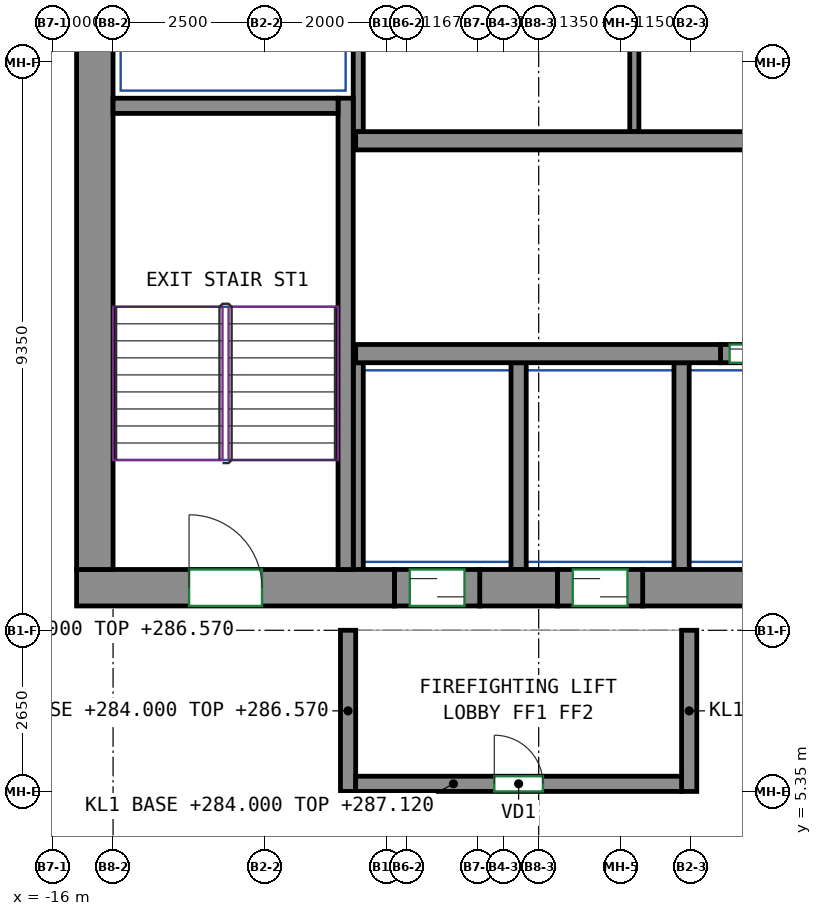
"""IFC4 building model, lengths in metres.
Left out: names, types, materials, properties, quantities, classifications, styles, units other than length and angle.
Written with IfcOpenShell. Run it as: python <this file> out.ifc"""

import sys

from ifc_helpers import new_model, si_unit, direction, frame, frame_2d, origin, place, context, subcontext, project, spatial, rectangle, extrude, source, transform, mapped, element, fill, save


model = new_model("IFC4")
c1 = context("Model", 3, precision=1e-05, world=origin(), true_north=direction((0.0, 1.0)))
c2 = subcontext(c1, "Body", "Model", "MODEL_VIEW")
j1 = project(units=[si_unit("LENGTHUNIT", "METRE"), si_unit("PLANEANGLEUNIT", "RADIAN")], contexts=[c1])
p1 = place(None, origin())
s1 = spatial("IfcSite", under=j1, at=p1, CompositionType="ELEMENT")
p2 = place(p1, origin())
s2 = spatial("IfcBuilding", under=s1, at=p2, CompositionType="ELEMENT")
p3 = place(p2, frame((0.0, 0.0, 284.0)))
s3 = spatial("IfcBuildingStorey", under=s2, at=p3, CompositionType="ELEMENT", Elevation=284.0)
m1 = source(origin(), c2, "Body", "SweptSolid", [
    extrude(rectangle(XDim=5.23, YDim=0.6, at=frame_2d((2.615, 0.0))), origin(), (0.0, 0.0, 1.0), 3.12),
])
p4 = place(p3, frame((-15.6, 8.7, 0.0), z_axis=(0.0, 0.0, 1.0), x_axis=(1.0, 0.0, 0.0)))
e1 = element("IfcWall", 1, at=p4, inside=s3, PredefinedType="SHEAR", context=c2, shape_type="MappedRepresentation", body=[
    mapped(m1, transform((0.0, 0.0, 0.0))),
])
p5 = place(p4, frame((1.85, 0.0, 0.0)))
e2 = element("IfcOpeningElement", 2, at=p5, cuts=e1, PredefinedType="OPENING", context=c2, shape_type="SweptSolid", body=[
    extrude(rectangle(XDim=1.2, YDim=2.1, at=frame_2d((0.6, 1.05))), frame((0.0, 0.31, 0.0), z_axis=(0.0, -1.0, 0.0), x_axis=(1.0, 0.0, 0.0)), (0.0, 0.0, 1.0), 0.62),
])
m2 = source(origin(), c2, "Body", "SweptSolid", [
    extrude(rectangle(XDim=1.28, YDim=0.6, at=frame_2d((0.64, 0.0))), origin(), (0.0, 0.0, 1.0), 3.12),
])
p6 = place(p3, frame((-8.97, 8.7, 0.0), z_axis=(0.0, 0.0, 1.0), x_axis=(1.0, 0.0, 0.0)))
e3 = element("IfcWall", 3, at=p6, inside=s3, PredefinedType="SHEAR", context=c2, shape_type="MappedRepresentation", body=[
    mapped(m2, transform((0.0, 0.0, 0.0))),
])
m3 = source(origin(), c2, "Body", "SweptSolid", [
    extrude(rectangle(XDim=14.18, YDim=0.6, at=frame_2d((7.09, 0.0))), origin(), (0.0, 0.0, 1.0), 3.12),
])
p7 = place(p3, frame((-6.29, 8.7, 0.0), z_axis=(0.0, 0.0, 1.0), x_axis=(1.0, 0.0, 0.0)))
e4 = element("IfcWall", 4, at=p7, inside=s3, PredefinedType="SHEAR", context=c2, shape_type="MappedRepresentation", body=[
    mapped(m3, transform((0.0, 0.0, 0.0))),
])
m4 = source(origin(), c2, "Body", "SweptSolid", [
    extrude(rectangle(XDim=12.0, YDim=0.6, at=frame_2d((6.0, 0.0))), origin(), (0.0, 0.0, 1.0), 3.12),
])
p8 = place(p3, frame((-15.3, 9.0, 0.0), z_axis=(0.0, 0.0, 1.0), x_axis=(0.0, 1.0, 0.0)))
e5 = element("IfcWall", 5, at=p8, inside=s3, PredefinedType="SHEAR", context=c2, shape_type="MappedRepresentation", body=[
    mapped(m4, transform((0.0, 0.0, 0.0))),
])
m5 = source(origin(), c2, "Body", "SweptSolid", [
    extrude(rectangle(XDim=7.75, YDim=0.25, at=frame_2d((3.875, 0.0))), origin(), (0.0, 0.0, 1.0), 3.12),
])
p9 = place(p3, frame((-11.175, 9.0, 0.0), z_axis=(0.0, 0.0, 1.0), x_axis=(0.0, 1.0, 0.0)))
e6 = element("IfcWall", 6, at=p9, inside=s3, PredefinedType="SHEAR", context=c2, shape_type="MappedRepresentation", body=[
    mapped(m5, transform((0.0, 0.0, 0.0))),
])
m6 = source(origin(), c2, "Body", "SweptSolid", [
    extrude(rectangle(XDim=3.7, YDim=0.25, at=frame_2d((1.85, 0.0))), origin(), (0.0, 0.0, 1.0), 3.12),
])
p10 = place(p3, frame((-15.0, 16.625, 0.0), z_axis=(0.0, 0.0, 1.0), x_axis=(1.0, 0.0, 0.0)))
e7 = element("IfcWall", 7, at=p10, inside=s3, PredefinedType="SHEAR", context=c2, shape_type="MappedRepresentation", body=[
    mapped(m6, transform((0.0, 0.0, 0.0))),
])
m7 = source(origin(), c2, "Body", "SweptSolid", [
    extrude(rectangle(XDim=6.0, YDim=0.3, at=frame_2d((3.0, 0.0))), origin(), (0.0, 0.0, 1.0), 3.12),
])
p11 = place(p3, frame((-11.01, 12.55, 0.0), z_axis=(0.0, 0.0, 1.0), x_axis=(1.0, 0.0, 0.0)))
e8 = element("IfcWall", 8, at=p11, inside=s3, PredefinedType="SHEAR", context=c2, shape_type="MappedRepresentation", body=[
    mapped(m7, transform((0.0, 0.0, 0.0))),
])
m8 = source(origin(), c2, "Body", "SweptSolid", [
    extrude(rectangle(XDim=22.08, YDim=0.3, at=frame_2d((11.04, 0.0))), origin(), (0.0, 0.0, 1.0), 3.12),
])
p12 = place(p3, frame((-11.01, 16.05, 0.0), z_axis=(0.0, 0.0, 1.0), x_axis=(1.0, 0.0, 0.0)))
e9 = element("IfcWall", 9, at=p12, inside=s3, PredefinedType="SHEAR", context=c2, shape_type="MappedRepresentation", body=[
    mapped(m8, transform((0.0, 0.0, 0.0))),
])
m9 = source(origin(), c2, "Body", "SweptSolid", [
    extrude(rectangle(XDim=1.4, YDim=0.3, at=frame_2d((0.7, 0.0))), origin(), (0.0, 0.0, 1.0), 3.12),
])
p13 = place(p3, frame((-5.01, 12.55, 0.0), z_axis=(0.0, 0.0, 1.0), x_axis=(1.0, 0.0, 0.0)))
e10 = element("IfcWall", 10, at=p13, inside=s3, PredefinedType="PARTITIONING", context=c2, shape_type="MappedRepresentation", body=[
    mapped(m9, transform((0.0, 0.0, 0.0))),
])
p14 = place(p13, frame((0.15, 0.0, 0.0)))
e11 = element("IfcOpeningElement", 11, at=p14, cuts=e10, PredefinedType="OPENING", context=c2, shape_type="SweptSolid", body=[
    extrude(rectangle(XDim=1.1, YDim=2.1, at=frame_2d((0.55, 1.05))), frame((0.0, 0.16, 0.0), z_axis=(0.0, -1.0, 0.0), x_axis=(1.0, 0.0, 0.0)), (0.0, 0.0, 1.0), 0.32),
])
m10 = source(origin(), c2, "Body", "SweptSolid", [
    extrude(rectangle(XDim=2.65, YDim=0.25, at=frame_2d((1.325, 0.0))), origin(), (0.0, 0.0, 1.0), 2.57),
])
for number, where, z_axis, x_axis in (
    (12, (-11.135, 5.35, 0.0), (0.0, 0.0, 1.0), (0.0, 1.0, 0.0)),
    (13, (-5.525, 5.35, 0.0), (0.0, 0.0, 1.0), (0.0, 1.0, 0.0)),
):
    element("IfcWall", number, at=place(p3, frame(where, z_axis=z_axis, x_axis=x_axis)), inside=s3, PredefinedType="PARTITIONING", context=c2, shape_type="MappedRepresentation", body=[
        mapped(m10, transform((0.0, 0.0, 0.0))),
    ])
m11 = source(origin(), c2, "Body", "SweptSolid", [
    extrude(rectangle(XDim=5.36, YDim=0.25, at=frame_2d((2.68, 0.0))), origin(), (0.0, 0.0, 1.0), 3.12),
])
p15 = place(p3, frame((-11.01, 5.475, 0.0), z_axis=(0.0, 0.0, 1.0), x_axis=(1.0, 0.0, 0.0)))
e14 = element("IfcWall", 14, at=p15, inside=s3, PredefinedType="PARTITIONING", context=c2, shape_type="MappedRepresentation", body=[
    mapped(m11, transform((0.0, 0.0, 0.0))),
])
p16 = place(p15, frame((2.28, 0.0, 0.0)))
e15 = element("IfcOpeningElement", 15, at=p16, cuts=e14, PredefinedType="OPENING", context=c2, shape_type="SweptSolid", body=[
    extrude(rectangle(XDim=0.8, YDim=2.0, at=frame_2d((0.4, 1.0))), frame((0.0, 0.135, 0.0), z_axis=(0.0, -1.0, 0.0), x_axis=(1.0, 0.0, 0.0)), (0.0, 0.0, 1.0), 0.27),
])
m12 = source(origin(), c2, "Body", "SweptSolid", [
    extrude(rectangle(XDim=4.8, YDim=0.165, at=frame_2d((2.4, 0.0))), origin(), (0.0, 0.0, 1.0), 3.12),
])
p17 = place(p3, frame((-10.968, 16.2, 0.0), z_axis=(0.0, 0.0, 1.0), x_axis=(0.0, 1.0, 0.0)))
e16 = element("IfcWall", 16, at=p17, inside=s3, PredefinedType="PARTITIONING", context=c2, shape_type="MappedRepresentation", body=[
    mapped(m12, transform((0.0, 0.0, 0.0))),
])
m13 = source(origin(), c2, "Body", "SweptSolid", [
    extrude(rectangle(XDim=3.4, YDim=0.165, at=frame_2d((1.7, 0.0))), origin(), (0.0, 0.0, 1.0), 3.12),
])
p18 = place(p3, frame((-10.968, 9.0, 0.0), z_axis=(0.0, 0.0, 1.0), x_axis=(0.0, 1.0, 0.0)))
e17 = element("IfcWall", 17, at=p18, inside=s3, PredefinedType="PARTITIONING", context=c2, shape_type="MappedRepresentation", body=[
    mapped(m13, transform((0.0, 0.0, 0.0))),
])
m14 = source(origin(), c2, "Body", "SweptSolid", [
    extrude(rectangle(XDim=3.4, YDim=0.25, at=frame_2d((1.7, 0.0))), origin(), (0.0, 0.0, 1.0), 3.12),
])
for number, where, z_axis, x_axis in (
    (18, (-5.65, 9.0, 0.0), (0.0, 0.0, 1.0), (0.0, 1.0, 0.0)),
    (19, (-8.33, 9.0, 0.0), (0.0, 0.0, 1.0), (0.0, 1.0, 0.0)),
):
    element("IfcWall", number, at=place(p3, frame(where, z_axis=z_axis, x_axis=x_axis)), inside=s3, PredefinedType="PARTITIONING", context=c2, shape_type="MappedRepresentation", body=[
        mapped(m14, transform((0.0, 0.0, 0.0))),
    ])
m15 = source(origin(), c2, "Body", "SweptSolid", [
    extrude(rectangle(XDim=4.8, YDim=0.15, at=frame_2d((2.4, 0.0))), origin(), (0.0, 0.0, 1.0), 3.12),
])
p19 = place(p3, frame((-6.427, 16.2, 0.0), z_axis=(0.0, 0.0, 1.0), x_axis=(0.0, 1.0, 0.0)))
e20 = element("IfcWall", 20, at=p19, inside=s3, PredefinedType="PARTITIONING", context=c2, shape_type="MappedRepresentation", body=[
    mapped(m15, transform((0.0, 0.0, 0.0))),
])
m16 = source(origin(), c2, "Body", "SweptSolid", [
    extrude(rectangle(XDim=1.4, YDim=0.6, at=frame_2d((0.7, 0.0))), origin(), (0.0, 0.0, 1.0), 2.7),
])
p20 = place(p3, frame((-10.37, 8.7, 0.0), z_axis=(0.0, 0.0, 1.0), x_axis=(1.0, 0.0, 0.0)))
e21 = element("IfcWall", 21, at=p20, inside=s3, PredefinedType="PARTITIONING", context=c2, shape_type="MappedRepresentation", body=[
    mapped(m16, transform((0.0, 0.0, 0.0))),
])
p21 = place(p20, frame((0.25, 0.0, 0.0)))
e22 = element("IfcOpeningElement", 22, at=p21, cuts=e21, PredefinedType="OPENING", context=c2, shape_type="SweptSolid", body=[
    extrude(rectangle(XDim=0.9, YDim=2.1, at=frame_2d((0.45, 1.05))), frame((0.0, 0.31, 0.0), z_axis=(0.0, -1.0, 0.0), x_axis=(1.0, 0.0, 0.0)), (0.0, 0.0, 1.0), 0.62),
])
m17 = source(origin(), c2, "Body", "SweptSolid", [
    extrude(rectangle(XDim=1.4, YDim=0.6, at=frame_2d((0.7, 0.0))), origin(), (0.0, 0.0, 1.0), 2.7),
])
p22 = place(p3, frame((-7.69, 8.7, 0.0), z_axis=(0.0, 0.0, 1.0), x_axis=(1.0, 0.0, 0.0)))
e23 = element("IfcWall", 23, at=p22, inside=s3, PredefinedType="PARTITIONING", context=c2, shape_type="MappedRepresentation", body=[
    mapped(m17, transform((0.0, 0.0, 0.0))),
])
p23 = place(p22, frame((0.25, 0.0, 0.0)))
e24 = element("IfcOpeningElement", 24, at=p23, cuts=e23, PredefinedType="OPENING", context=c2, shape_type="SweptSolid", body=[
    extrude(rectangle(XDim=0.9, YDim=2.1, at=frame_2d((0.45, 1.05))), frame((0.0, 0.31, 0.0), z_axis=(0.0, -1.0, 0.0), x_axis=(1.0, 0.0, 0.0)), (0.0, 0.0, 1.0), 0.62),
])
p24 = place(p16, origin())
e25 = element("IfcDoor", 25, at=p24, inside=s3, OperationType="SINGLE_SWING_LEFT", PredefinedType="DOOR", context=c2, shape_type="SweptSolid", body=[
    extrude(rectangle(XDim=0.8, YDim=2.0, at=frame_2d((0.4, 1.0))), frame((0.0, 0.025, 0.0), z_axis=(0.0, -1.0, 0.0), x_axis=(1.0, 0.0, 0.0)), (0.0, 0.0, 1.0), 0.05),
])
fill(e15, e25)
p25 = place(p21, origin())
e26 = element("IfcDoor", 26, at=p25, inside=s3, OperationType="SLIDING_TO_LEFT", PredefinedType="DOOR", context=c2, shape_type="SweptSolid", body=[
    extrude(rectangle(XDim=0.9, YDim=2.1, at=frame_2d((0.45, 1.05))), frame((0.0, 0.205, 0.0), z_axis=(0.0, -1.0, 0.0), x_axis=(1.0, 0.0, 0.0)), (0.0, 0.0, 1.0), 0.05),
])
fill(e22, e26)
p26 = place(p23, origin())
e27 = element("IfcDoor", 27, at=p26, inside=s3, OperationType="SLIDING_TO_RIGHT", PredefinedType="DOOR", context=c2, shape_type="SweptSolid", body=[
    extrude(rectangle(XDim=0.9, YDim=2.1, at=frame_2d((0.45, 1.05))), frame((0.0, 0.205, 0.0), z_axis=(0.0, -1.0, 0.0), x_axis=(1.0, 0.0, 0.0)), (0.0, 0.0, 1.0), 0.05),
])
fill(e24, e27)
p27 = place(p14, origin())
e28 = element("IfcDoor", 28, at=p27, inside=s3, OperationType="DOUBLE_DOOR_SLIDING", PredefinedType="DOOR", context=c2, shape_type="SweptSolid", body=[
    extrude(rectangle(XDim=1.1, YDim=2.1, at=frame_2d((0.55, 1.05))), frame((0.0, 0.025, 0.0), z_axis=(0.0, -1.0, 0.0), x_axis=(1.0, 0.0, 0.0)), (0.0, 0.0, 1.0), 0.05),
])
fill(e11, e28)
p28 = place(p5, origin())
e29 = element("IfcDoor", 29, at=p28, inside=s3, OperationType="DOUBLE_DOOR_SINGLE_SWING", PredefinedType="DOOR", context=c2, shape_type="SweptSolid", body=[
    extrude(rectangle(XDim=1.2, YDim=2.1, at=frame_2d((0.6, 1.05))), frame((0.0, 0.205, 0.0), z_axis=(0.0, -1.0, 0.0), x_axis=(1.0, 0.0, 0.0)), (0.0, 0.0, 1.0), 0.05),
])
fill(e2, e29)
save(model, sys.argv[1])
